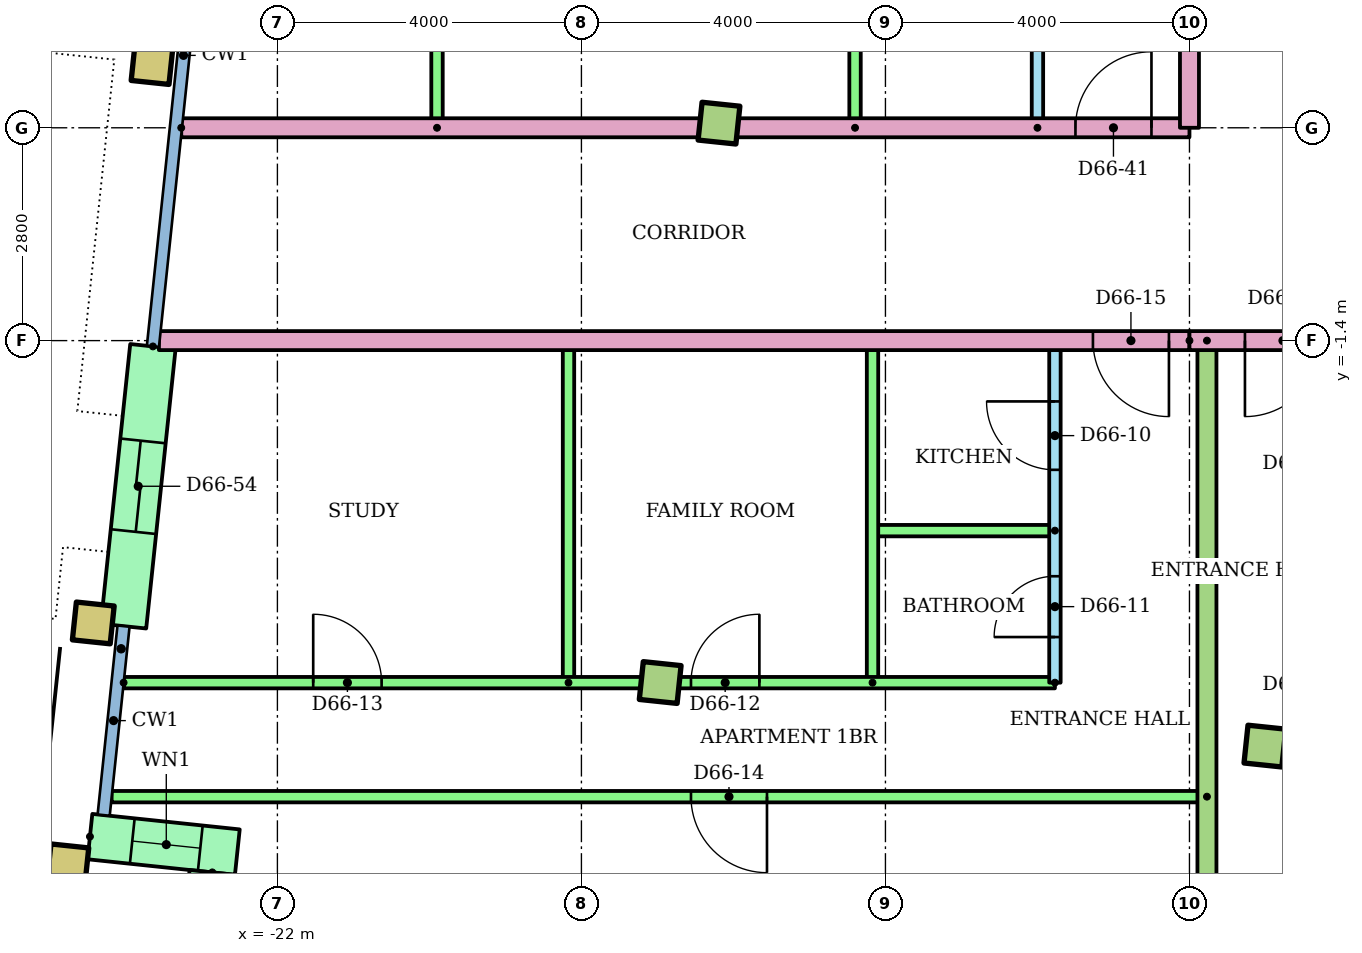
"""IFC4 building model, lengths in metres.
Left out: names, types, materials, properties, quantities, classifications, styles, units other than length and angle.
Written with IfcOpenShell. Run it as: python <this file> out.ifc"""

import sys

from ifc_helpers import new_model, si_unit, direction, frame, frame_2d, origin, origin_2d, place, context, subcontext, project, spatial, rectangle, hollow_rectangle, extrude, element, fill, save


model = new_model("IFC4")
c1 = context("Model", 3, precision=1e-05, world=origin(), true_north=direction((0.0, 1.0)))
c2 = subcontext(c1, "Body", "Model", "MODEL_VIEW")
j1 = project(units=[si_unit("LENGTHUNIT", "METRE"), si_unit("PLANEANGLEUNIT", "RADIAN")], contexts=[c1])
p1 = place(None, origin())
s1 = spatial("IfcSite", under=j1, at=p1, CompositionType="ELEMENT")
p2 = place(p1, origin())
s2 = spatial("IfcBuilding", under=s1, at=p2, CompositionType="ELEMENT")
p3 = place(p2, frame((0.0, 0.0, 256.3)))
s3 = spatial("IfcBuildingStorey", under=s2, at=p3, CompositionType="ELEMENT", Elevation=256.3)
for number, where, z_axis, x_axis in (
    (1, (-24.757, -8.297, 0.0), (0.0, 0.0, 1.0), (0.995, -0.105, 0.0)),
    (2, (-24.423, -5.115, 0.0), (0.0, 0.0, 1.0), (0.995, -0.105, 0.0)),
):
    element("IfcColumn", number, at=place(p3, frame(where, z_axis=z_axis, x_axis=x_axis)), inside=s3, PredefinedType="COLUMN", context=c2, shape_type="SweptSolid", body=[
        extrude(hollow_rectangle(XDim=0.5, YDim=0.5, WallThickness=0.025, at=origin_2d()), origin(), (0.0, 0.0, 1.0), 3.2),
    ])
for number, where, z_axis, x_axis in (
    (3, (-16.964, -5.898, 0.0), (0.0, 0.0, 1.0), (0.995, -0.105, 0.0)),
    (4, (-9.007, -6.735, 0.0), (0.0, 0.0, 1.0), (0.995, -0.105, 0.0)),
):
    element("IfcColumn", number, at=place(p3, frame(where, z_axis=z_axis, x_axis=x_axis)), inside=s3, PredefinedType="COLUMN", context=c2, shape_type="SweptSolid", body=[
        extrude(rectangle(XDim=0.5, YDim=0.5, at=origin_2d()), origin(), (0.0, 0.0, 1.0), 3.2),
    ])
p4 = place(p3, frame((-23.649, 2.245, 0.0), z_axis=(0.0, 0.0, 1.0), x_axis=(0.994521895368, -0.104528463268, 0.0)))
e5 = element("IfcColumn", 5, at=p4, inside=s3, PredefinedType="COLUMN", context=c2, shape_type="SweptSolid", body=[
    extrude(hollow_rectangle(XDim=0.5, YDim=0.5, WallThickness=0.025, at=origin_2d()), origin(), (0.0, 0.0, 1.0), 3.2),
])
p5 = place(p3, frame((-16.19, 1.461, 0.0), z_axis=(0.0, 0.0, 1.0), x_axis=(0.994521895368, -0.104528463268, 0.0)))
e6 = element("IfcColumn", 6, at=p5, inside=s3, PredefinedType="COLUMN", context=c2, shape_type="SweptSolid", body=[
    extrude(rectangle(XDim=0.5, YDim=0.5, at=origin_2d()), origin(), (0.0, 0.0, 1.0), 3.2),
])
p6 = place(p3, frame((-23.638, -1.476, 0.0), z_axis=(0.0, 0.0, 1.0), x_axis=(-0.104513052986, -0.994523514933, 0.0)))
e7 = element("IfcWall", 7, at=p6, inside=s3, PredefinedType="STANDARD", context=c2, shape_type="SweptSolid", body=[
    extrude(rectangle(XDim=3.7, YDim=0.6, at=frame_2d((1.85, 0.0))), origin(), (0.0, 0.0, 1.0), 2.92),
])
p7 = place(p6, frame((1.25, 0.0, 0.0)))
e8 = element("IfcOpeningElement", 8, at=p7, cuts=e7, PredefinedType="OPENING", context=c2, shape_type="SweptSolid", body=[
    extrude(rectangle(XDim=1.2, YDim=2.1, at=frame_2d((0.6, 1.05))), frame((0.0, 0.31, 0.0), z_axis=(0.0, -1.0, 0.0), x_axis=(1.0, 0.0, 0.0)), (0.0, 0.0, 1.0), 0.62),
])
p8 = place(p3, frame((-24.467, -7.925, 0.0), z_axis=(0.0, 0.0, 1.0), x_axis=(0.994521219184, -0.104534896528, 0.0)))
e9 = element("IfcWall", 9, at=p8, inside=s3, PredefinedType="STANDARD", context=c2, shape_type="SweptSolid", body=[
    extrude(rectangle(XDim=1.95, YDim=0.6, at=frame_2d((0.975, 0.0))), origin(), (0.0, 0.0, 1.0), 2.92),
])
p9 = place(p8, frame((0.56, 0.0, 0.9)))
e10 = element("IfcOpeningElement", 10, at=p9, cuts=e9, PredefinedType="OPENING", context=c2, shape_type="SweptSolid", body=[
    extrude(rectangle(XDim=0.9, YDim=1.5, at=frame_2d((0.45, 0.75))), frame((0.0, 0.31, 0.0), z_axis=(0.0, -1.0, 0.0), x_axis=(1.0, 0.0, 0.0)), (0.0, 0.0, 1.0), 0.62),
])
p10 = place(p3, frame((-22.857, -8.396, 0.0), z_axis=(0.0, 0.0, 1.0), x_axis=(-0.104444712852, -0.994530694326, 0.0)))
e11 = element("IfcWall", 11, at=p10, inside=s3, PredefinedType="STANDARD", context=c2, shape_type="SweptSolid", body=[
    extrude(rectangle(XDim=0.9, YDim=0.6, at=frame_2d((0.45, 0.0))), origin(), (0.0, 0.0, 1.0), 2.92),
])
p11 = place(p3, frame((-11.77, -5.9, 0.0), z_axis=(0.0, 0.0, 1.0), x_axis=(0.0, 1.0, 0.0)))
e12 = element("IfcWall", 12, at=p11, inside=s3, PredefinedType="PARTITIONING", context=c2, shape_type="SweptSolid", body=[
    extrude(rectangle(XDim=4.5, YDim=0.15, at=frame_2d((2.25, 0.0))), origin(), (0.0, 0.0, 1.0), 2.4),
])
p12 = place(p11, frame((2.8, 0.0, 0.0)))
e13 = element("IfcOpeningElement", 13, at=p12, cuts=e12, PredefinedType="OPENING", context=c2, shape_type="SweptSolid", body=[
    extrude(rectangle(XDim=0.9, YDim=2.1, at=frame_2d((0.45, 1.05))), frame((0.0, 0.085, 0.0), z_axis=(0.0, -1.0, 0.0), x_axis=(1.0, 0.0, 0.0)), (0.0, 0.0, 1.0), 0.17),
])
p13 = place(p11, frame((0.6, 0.0, 0.0)))
e14 = element("IfcOpeningElement", 14, at=p13, cuts=e12, PredefinedType="OPENING", context=c2, shape_type="SweptSolid", body=[
    extrude(rectangle(XDim=0.8, YDim=2.1, at=frame_2d((0.4, 1.05))), frame((0.0, 0.085, 0.0), z_axis=(0.0, -1.0, 0.0), x_axis=(1.0, 0.0, 0.0)), (0.0, 0.0, 1.0), 0.17),
])
p14 = place(p3, frame((-11.77, -3.9, 0.0), z_axis=(0.0, 0.0, 1.0), x_axis=(-1.0, 0.0, 0.0)))
e15 = element("IfcWall", 15, at=p14, inside=s3, PredefinedType="PARTITIONING", context=c2, shape_type="SweptSolid", body=[
    extrude(rectangle(XDim=2.4, YDim=0.15, at=frame_2d((1.2, 0.0))), origin(), (0.0, 0.0, 1.0), 2.4),
])
for number, where, z_axis, x_axis in (
    (16, (-14.17, -5.9, 0.0), (0.0, 0.0, 1.0), (0.0, 1.0, 0.0)),
    (17, (-18.17, -5.9, 0.0), (0.0, 0.0, 1.0), (0.0, 1.0, 0.0)),
):
    element("IfcWall", number, at=place(p3, frame(where, z_axis=z_axis, x_axis=x_axis)), inside=s3, PredefinedType="PARTITIONING", context=c2, shape_type="SweptSolid", body=[
        extrude(rectangle(XDim=4.5, YDim=0.15, at=frame_2d((2.25, 0.0))), origin(), (0.0, 0.0, 1.0), 2.4),
    ])
p15 = place(p3, frame((-24.023, -5.9, 0.0)))
e18 = element("IfcWall", 18, at=p15, inside=s3, PredefinedType="PARTITIONING", context=c2, shape_type="SweptSolid", body=[
    extrude(rectangle(XDim=12.253, YDim=0.15, at=frame_2d((6.127, 0.0))), origin(), (0.0, 0.0, 1.0), 2.4),
])
p16 = place(p15, frame((7.465, 0.0, 0.0)))
e19 = element("IfcOpeningElement", 19, at=p16, cuts=e18, PredefinedType="OPENING", context=c2, shape_type="SweptSolid", body=[
    extrude(rectangle(XDim=0.9, YDim=2.1, at=frame_2d((0.45, 1.05))), frame((0.0, 0.085, 0.0), z_axis=(0.0, -1.0, 0.0), x_axis=(1.0, 0.0, 0.0)), (0.0, 0.0, 1.0), 0.17),
])
p17 = place(p15, frame((2.494, 0.0, 0.0)))
e20 = element("IfcOpeningElement", 20, at=p17, cuts=e18, PredefinedType="OPENING", context=c2, shape_type="SweptSolid", body=[
    extrude(rectangle(XDim=0.9, YDim=2.1, at=frame_2d((0.45, 1.05))), frame((0.0, 0.085, 0.0), z_axis=(0.0, -1.0, 0.0), x_axis=(1.0, 0.0, 0.0)), (0.0, 0.0, 1.0), 0.17),
])
p18 = place(p3, frame((-9.77, -7.4, 0.0), z_axis=(0.0, 0.0, 1.0), x_axis=(-1.0, 0.0, 0.0)))
e21 = element("IfcWall", 21, at=p18, inside=s3, PredefinedType="PARTITIONING", context=c2, shape_type="SweptSolid", body=[
    extrude(rectangle(XDim=14.411, YDim=0.15, at=frame_2d((7.206, 0.0))), origin(), (0.0, 0.0, 1.0), 2.4),
])
p19 = place(p18, frame((5.789, 0.0, 0.0)))
e22 = element("IfcOpeningElement", 22, at=p19, cuts=e21, PredefinedType="OPENING", context=c2, shape_type="SweptSolid", body=[
    extrude(rectangle(XDim=1.0, YDim=2.1, at=frame_2d((0.5, 1.05))), frame((0.0, 0.085, 0.0), z_axis=(0.0, -1.0, 0.0), x_axis=(1.0, 0.0, 0.0)), (0.0, 0.0, 1.0), 0.17),
])
p20 = place(p3, frame((-9.77, -1.4, 0.0), z_axis=(0.0, 0.0, 1.0), x_axis=(0.0, -1.0, 0.0)))
e23 = element("IfcWall", 23, at=p20, inside=s3, PredefinedType="PARTITIONING", context=c2, shape_type="SweptSolid", body=[
    extrude(rectangle(XDim=12.504, YDim=0.25, at=frame_2d((6.252, 0.0))), origin(), (0.0, 0.0, 1.0), 2.4),
])
p21 = place(p3, frame((-10.0, -1.4, 0.0), z_axis=(0.0, 0.0, 1.0), x_axis=(-1.0, 0.0, 0.0)))
e24 = element("IfcWall", 24, at=p21, inside=s3, PredefinedType="PARTITIONING", context=c2, shape_type="SweptSolid", body=[
    extrude(rectangle(XDim=13.56, YDim=0.25, at=frame_2d((6.78, 0.0))), origin(), (0.0, 0.0, 1.0), 2.4),
])
p22 = place(p21, frame((0.27, 0.0, 0.0)))
e25 = element("IfcOpeningElement", 25, at=p22, cuts=e24, PredefinedType="OPENING", context=c2, shape_type="SweptSolid", body=[
    extrude(rectangle(XDim=1.0, YDim=2.1, at=frame_2d((0.5, 1.05))), frame((0.0, 0.135, 0.0), z_axis=(0.0, -1.0, 0.0), x_axis=(1.0, 0.0, 0.0)), (0.0, 0.0, 1.0), 0.27),
])
p23 = place(p3, frame((-12.0, 1.4, 0.0), z_axis=(0.0, 0.0, 1.0), x_axis=(0.0, 1.0, 0.0)))
e26 = element("IfcWall", 26, at=p23, inside=s3, PredefinedType="PARTITIONING", context=c2, shape_type="SweptSolid", body=[
    extrude(rectangle(XDim=11.5, YDim=0.15, at=frame_2d((5.75, 0.0))), origin(), (0.0, 0.0, 1.0), 2.4),
])
p24 = place(p23, frame((2.675, 0.0, 0.0)))
e27 = element("IfcOpeningElement", 27, at=p24, cuts=e26, PredefinedType="OPENING", context=c2, shape_type="SweptSolid", body=[
    extrude(rectangle(XDim=0.9, YDim=2.1, at=frame_2d((0.45, 1.05))), frame((0.0, 0.085, 0.0), z_axis=(0.0, -1.0, 0.0), x_axis=(1.0, 0.0, 0.0)), (0.0, 0.0, 1.0), 0.17),
])
p25 = place(p23, frame((8.475, 0.0, 0.0)))
e28 = element("IfcOpeningElement", 28, at=p25, cuts=e26, PredefinedType="OPENING", context=c2, shape_type="SweptSolid", body=[
    extrude(rectangle(XDim=0.8, YDim=2.1, at=frame_2d((0.4, 1.05))), frame((0.0, 0.085, 0.0), z_axis=(0.0, -1.0, 0.0), x_axis=(1.0, 0.0, 0.0)), (0.0, 0.0, 1.0), 0.17),
])
for number, where, z_axis, x_axis in (
    (29, (-14.4, 1.4, 0.0), (0.0, 0.0, 1.0), (0.0, 1.0, 0.0)),
    (30, (-19.9, 1.4, 0.0), (0.0, 0.0, 1.0), (0.0, 1.0, 0.0)),
):
    element("IfcWall", number, at=place(p3, frame(where, z_axis=z_axis, x_axis=x_axis)), inside=s3, PredefinedType="PARTITIONING", context=c2, shape_type="SweptSolid", body=[
        extrude(rectangle(XDim=11.5, YDim=0.15, at=frame_2d((5.75, 0.0))), origin(), (0.0, 0.0, 1.0), 2.4),
    ])
p26 = place(p3, frame((-23.265, 1.4, 0.0)))
e31 = element("IfcWall", 31, at=p26, inside=s3, PredefinedType="PARTITIONING", context=c2, shape_type="SweptSolid", body=[
    extrude(rectangle(XDim=13.265, YDim=0.25, at=frame_2d((6.633, 0.0))), origin(), (0.0, 0.0, 1.0), 2.4),
])
p27 = place(p26, frame((11.765, 0.0, 0.0)))
e32 = element("IfcOpeningElement", 32, at=p27, cuts=e31, PredefinedType="OPENING", context=c2, shape_type="SweptSolid", body=[
    extrude(rectangle(XDim=1.0, YDim=2.1, at=frame_2d((0.5, 1.05))), frame((0.0, 0.135, 0.0), z_axis=(0.0, -1.0, 0.0), x_axis=(1.0, 0.0, 0.0)), (0.0, 0.0, 1.0), 0.27),
])
p28 = place(p3, frame((10.0, -1.4, 0.0), z_axis=(0.0, 0.0, 1.0), x_axis=(-1.0, 0.0, 0.0)))
e33 = element("IfcWall", 33, at=p28, inside=s3, PredefinedType="PARTITIONING", context=c2, shape_type="SweptSolid", body=[
    extrude(rectangle(XDim=20.0, YDim=0.25, at=frame_2d((10.0, 0.0))), origin(), (0.0, 0.0, 1.0), 2.4),
])
p29 = place(p28, frame((18.27, 0.0, 0.0)))
e34 = element("IfcOpeningElement", 34, at=p29, cuts=e33, PredefinedType="OPENING", context=c2, shape_type="SweptSolid", body=[
    extrude(rectangle(XDim=1.0, YDim=2.1, at=frame_2d((0.5, 1.05))), frame((0.0, 0.135, 0.0), z_axis=(0.0, -1.0, 0.0), x_axis=(1.0, 0.0, 0.0)), (0.0, 0.0, 1.0), 0.27),
])
p30 = place(p3, frame((-10.0, 3.0, 0.0), z_axis=(0.0, 0.0, 1.0), x_axis=(0.0, -1.0, 0.0)))
e35 = element("IfcWall", 35, at=p30, inside=s3, PredefinedType="PARTITIONING", context=c2, shape_type="SweptSolid", body=[
    extrude(rectangle(XDim=1.6, YDim=0.25, at=frame_2d((0.8, 0.0))), origin(), (0.0, 0.0, 1.0), 2.4),
])
p31 = place(p9, origin())
e36 = element("IfcWindow", 36, at=p31, inside=s3, PartitioningType="SINGLE_PANEL", PredefinedType="WINDOW", context=c2, shape_type="SweptSolid", body=[
    extrude(rectangle(XDim=0.9, YDim=1.5, at=frame_2d((0.45, 0.75))), frame((0.0, 0.03, 0.0), z_axis=(0.0, -1.0, 0.0), x_axis=(1.0, 0.0, 0.0)), (0.0, 0.0, 1.0), 0.06),
])
fill(e10, e36)
p32 = place(p12, origin())
e37 = element("IfcDoor", 37, at=p32, inside=s3, OperationType="SINGLE_SWING_RIGHT", PredefinedType="DOOR", context=c2, shape_type="SweptSolid", body=[
    extrude(rectangle(XDim=0.9, YDim=2.1, at=frame_2d((0.45, 1.05))), frame((0.0, 0.025, 0.0), z_axis=(0.0, -1.0, 0.0), x_axis=(1.0, 0.0, 0.0)), (0.0, 0.0, 1.0), 0.05),
])
fill(e13, e37)
p33 = place(p13, origin())
e38 = element("IfcDoor", 38, at=p33, inside=s3, OperationType="SINGLE_SWING_LEFT", PredefinedType="DOOR", context=c2, shape_type="SweptSolid", body=[
    extrude(rectangle(XDim=0.8, YDim=2.1, at=frame_2d((0.4, 1.05))), frame((0.0, 0.025, 0.0), z_axis=(0.0, -1.0, 0.0), x_axis=(1.0, 0.0, 0.0)), (0.0, 0.0, 1.0), 0.05),
])
fill(e14, e38)
p34 = place(p16, origin())
e39 = element("IfcDoor", 39, at=p34, inside=s3, OperationType="SINGLE_SWING_RIGHT", PredefinedType="DOOR", context=c2, shape_type="SweptSolid", body=[
    extrude(rectangle(XDim=0.9, YDim=2.1, at=frame_2d((0.45, 1.05))), frame((0.0, 0.025, 0.0), z_axis=(0.0, -1.0, 0.0), x_axis=(1.0, 0.0, 0.0)), (0.0, 0.0, 1.0), 0.05),
])
fill(e19, e39)
p35 = place(p17, origin())
e40 = element("IfcDoor", 40, at=p35, inside=s3, OperationType="SINGLE_SWING_LEFT", PredefinedType="DOOR", context=c2, shape_type="SweptSolid", body=[
    extrude(rectangle(XDim=0.9, YDim=2.1, at=frame_2d((0.45, 1.05))), frame((0.0, 0.025, 0.0), z_axis=(0.0, -1.0, 0.0), x_axis=(1.0, 0.0, 0.0)), (0.0, 0.0, 1.0), 0.05),
])
fill(e20, e40)
p36 = place(p19, origin())
e41 = element("IfcDoor", 41, at=p36, inside=s3, OperationType="SINGLE_SWING_LEFT", PredefinedType="DOOR", context=c2, shape_type="SweptSolid", body=[
    extrude(rectangle(XDim=1.0, YDim=2.1, at=frame_2d((0.5, 1.05))), frame((0.0, 0.025, 0.0), z_axis=(0.0, -1.0, 0.0), x_axis=(1.0, 0.0, 0.0)), (0.0, 0.0, 1.0), 0.05),
])
fill(e22, e41)
p37 = place(p22, origin())
e42 = element("IfcDoor", 42, at=p37, inside=s3, OperationType="SINGLE_SWING_LEFT", PredefinedType="DOOR", context=c2, shape_type="SweptSolid", body=[
    extrude(rectangle(XDim=1.0, YDim=2.1, at=frame_2d((0.5, 1.05))), frame((0.0, 0.025, 0.0), z_axis=(0.0, -1.0, 0.0), x_axis=(1.0, 0.0, 0.0)), (0.0, 0.0, 1.0), 0.05),
])
fill(e25, e42)
p38 = place(p29, origin())
e43 = element("IfcDoor", 43, at=p38, inside=s3, OperationType="SINGLE_SWING_RIGHT", PredefinedType="DOOR", context=c2, shape_type="SweptSolid", body=[
    extrude(rectangle(XDim=1.0, YDim=2.1, at=frame_2d((0.5, 1.05))), frame((0.0, 0.025, 0.0), z_axis=(0.0, -1.0, 0.0), x_axis=(1.0, 0.0, 0.0)), (0.0, 0.0, 1.0), 0.05),
])
fill(e34, e43)
p39 = place(p27, origin())
e44 = element("IfcDoor", 44, at=p39, inside=s3, OperationType="SINGLE_SWING_RIGHT", PredefinedType="DOOR", context=c2, shape_type="SweptSolid", body=[
    extrude(rectangle(XDim=1.0, YDim=2.1, at=frame_2d((0.5, 1.05))), frame((0.0, 0.025, 0.0), z_axis=(0.0, -1.0, 0.0), x_axis=(1.0, 0.0, 0.0)), (0.0, 0.0, 1.0), 0.05),
])
fill(e32, e44)
p40 = place(p7, origin())
e45 = element("IfcDoor", 45, at=p40, inside=s3, OperationType="SLIDING_TO_LEFT", PredefinedType="DOOR", context=c2, shape_type="SweptSolid", body=[
    extrude(rectangle(XDim=1.2, YDim=2.1, at=frame_2d((0.6, 1.05))), frame((0.0, 0.025, 0.0), z_axis=(0.0, -1.0, 0.0), x_axis=(1.0, 0.0, 0.0)), (0.0, 0.0, 1.0), 0.05),
])
fill(e8, e45)
save(model, sys.argv[1])
